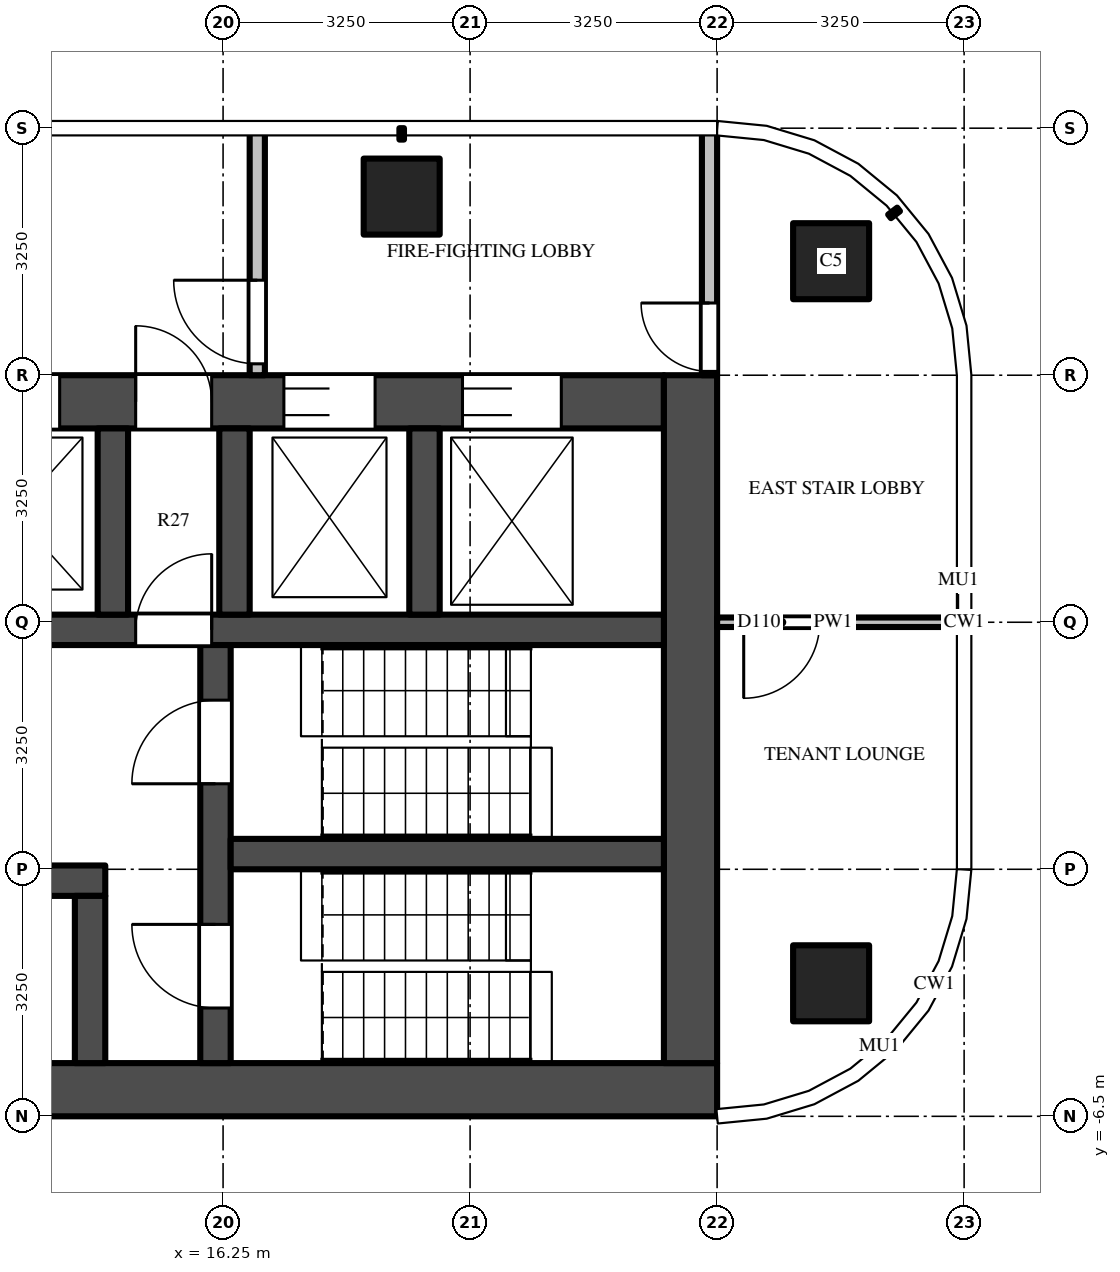
"""IFC4 building model, lengths in metres.
Left out: names, types, materials, properties, quantities, classifications, styles, units other than length and angle.
Written with IfcOpenShell. Run it as: python <this file> out.ifc"""

import sys

from ifc_helpers import new_model, si_unit, direction, frame, frame_2d, origin, origin_2d, place, context, subcontext, project, spatial, rectangle, extrude, source, transform, mapped, element, fill, save


model = new_model("IFC4")
c1 = context("Model", 3, precision=1e-05, world=origin(), true_north=direction((0.0, 1.0)))
c2 = subcontext(c1, "Body", "Model", "MODEL_VIEW")
j1 = project(units=[si_unit("LENGTHUNIT", "METRE"), si_unit("PLANEANGLEUNIT", "RADIAN")], contexts=[c1])
p1 = place(None, origin())
s1 = spatial("IfcSite", under=j1, at=p1, CompositionType="ELEMENT")
p2 = place(p1, origin())
s2 = spatial("IfcBuilding", under=s1, at=p2, CompositionType="ELEMENT")
p3 = place(p2, frame((0.0, 0.0, 302.8)))
s3 = spatial("IfcBuildingStorey", under=s2, at=p3, CompositionType="ELEMENT", Elevation=302.8)
m1 = source(origin(), c2, "Body", "SweptSolid", [
    extrude(rectangle(XDim=1.0, YDim=1.0, at=origin_2d()), origin(), (0.0, 0.0, 1.0), 3.9),
])
for number, where, z_axis, x_axis in (
    (1, (18.6, 5.6, 0.0), (0.0, 0.0, 1.0), (1.0, 0.0, 0.0)),
    (2, (24.25, 4.75, 0.0), (0.0, 0.0, 1.0), (1.0, 0.0, 0.0)),
    (3, (24.25, -4.75, 0.0), (0.0, 0.0, 1.0), (1.0, 0.0, 0.0)),
):
    element("IfcColumn", number, at=place(p3, frame(where, z_axis=z_axis, x_axis=x_axis)), inside=s3, PredefinedType="COLUMN", context=c2, shape_type="MappedRepresentation", body=[
        mapped(m1, transform((0.0, 0.0, 0.0))),
    ])
m2 = source(origin(), c2, "Body", "SweptSolid", [
    extrude(rectangle(XDim=16.65, YDim=0.7, at=frame_2d((8.325, 0.0))), origin(), (0.0, 0.0, 1.0), 3.7),
])
p4 = place(p3, frame((6.1, -6.15, 0.0), z_axis=(0.0, 0.0, 1.0), x_axis=(1.0, 0.0, 0.0)))
e4 = element("IfcWall", 4, at=p4, inside=s3, PredefinedType="SHEAR", context=c2, shape_type="MappedRepresentation", body=[
    mapped(m2, transform((0.0, 0.0, 0.0))),
])
m3 = source(origin(), c2, "Body", "SweptSolid", [
    extrude(rectangle(XDim=14.85, YDim=0.7, at=frame_2d((7.425, 0.0))), origin(), (0.0, 0.0, 1.0), 3.7),
])
p5 = place(p3, frame((7.2, 2.9, 0.0), z_axis=(0.0, 0.0, 1.0), x_axis=(1.0, 0.0, 0.0)))
e5 = element("IfcWall", 5, at=p5, inside=s3, PredefinedType="SHEAR", context=c2, shape_type="MappedRepresentation", body=[
    mapped(m3, transform((0.0, 0.0, 0.0))),
])
m4 = source(origin(), c2, "Body", "SweptSolid", [
    extrude(rectangle(XDim=1.2, YDim=2.1, at=frame_2d((0.6, 1.05))), frame((0.0, 0.36, 0.0), z_axis=(0.0, -1.0, 0.0), x_axis=(1.0, 0.0, 0.0)), (0.0, 0.0, 1.0), 0.72),
])
p6 = place(p5, frame((5.7, 0.0, 0.0)))
e6 = element("IfcOpeningElement", 6, at=p6, cuts=e5, PredefinedType="OPENING", context=c2, shape_type="MappedRepresentation", body=[
    mapped(m4, transform((0.0, 0.0, 0.0))),
])
m5 = source(origin(), c2, "Body", "SweptSolid", [
    extrude(rectangle(XDim=1.3, YDim=2.1, at=frame_2d((0.65, 1.05))), frame((0.0, 0.36, 0.0), z_axis=(0.0, -1.0, 0.0), x_axis=(1.0, 0.0, 0.0)), (0.0, 0.0, 1.0), 0.72),
])
p7 = place(p5, frame((12.2, 0.0, 0.0)))
e7 = element("IfcOpeningElement", 7, at=p7, cuts=e5, PredefinedType="OPENING", context=c2, shape_type="MappedRepresentation", body=[
    mapped(m5, transform((0.0, 0.0, 0.0))),
])
p8 = place(p5, frame((9.85, 0.0, 0.0)))
e8 = element("IfcOpeningElement", 8, at=p8, cuts=e5, PredefinedType="OPENING", context=c2, shape_type="MappedRepresentation", body=[
    mapped(m4, transform((0.0, 0.0, 0.0))),
])
m6 = source(origin(), c2, "Body", "SweptSolid", [
    extrude(rectangle(XDim=1.0, YDim=2.1, at=frame_2d((0.5, 1.05))), frame((0.0, 0.36, 0.0), z_axis=(0.0, -1.0, 0.0), x_axis=(1.0, 0.0, 0.0)), (0.0, 0.0, 1.0), 0.72),
])
p9 = place(p5, frame((7.9, 0.0, 0.0)))
e9 = element("IfcOpeningElement", 9, at=p9, cuts=e5, PredefinedType="OPENING", context=c2, shape_type="MappedRepresentation", body=[
    mapped(m6, transform((0.0, 0.0, 0.0))),
])
m7 = source(origin(), c2, "Body", "SweptSolid", [
    extrude(rectangle(XDim=0.8, YDim=2.1, at=frame_2d((0.4, 1.05))), frame((0.0, 0.36, 0.0), z_axis=(0.0, -1.0, 0.0), x_axis=(1.0, 0.0, 0.0)), (0.0, 0.0, 1.0), 0.72),
])
p10 = place(p5, frame((0.212, 0.0, 0.0)))
e10 = element("IfcOpeningElement", 10, at=p10, cuts=e5, PredefinedType="OPENING", context=c2, shape_type="MappedRepresentation", body=[
    mapped(m7, transform((0.0, 0.0, 0.0))),
])
p11 = place(p5, frame((1.95, 0.0, 0.0)))
e11 = element("IfcOpeningElement", 11, at=p11, cuts=e5, PredefinedType="OPENING", context=c2, shape_type="MappedRepresentation", body=[
    mapped(m6, transform((0.0, 0.0, 0.0))),
])
p12 = place(p5, frame((3.837, 0.0, 0.0)))
e12 = element("IfcOpeningElement", 12, at=p12, cuts=e5, PredefinedType="OPENING", context=c2, shape_type="MappedRepresentation", body=[
    mapped(m7, transform((0.0, 0.0, 0.0))),
])
m8 = source(origin(), c2, "Body", "SweptSolid", [
    extrude(rectangle(XDim=9.05, YDim=0.7, at=frame_2d((4.525, 0.0))), origin(), (0.0, 0.0, 1.0), 3.7),
])
p13 = place(p3, frame((22.4, -5.8, 0.0), z_axis=(0.0, 0.0, 1.0), x_axis=(0.0, 1.0, 0.0)))
e13 = element("IfcWall", 13, at=p13, inside=s3, PredefinedType="SHEAR", context=c2, shape_type="MappedRepresentation", body=[
    mapped(m8, transform((0.0, 0.0, 0.0))),
])
m9 = source(origin(), c2, "Body", "SweptSolid", [
    extrude(rectangle(XDim=7.5, YDim=0.4, at=frame_2d((3.75, 0.0))), origin(), (0.0, 0.0, 1.0), 3.7),
])
p14 = place(p3, frame((7.2, -3.4, 0.0), z_axis=(0.0, 0.0, 1.0), x_axis=(1.0, 0.0, 0.0)))
e14 = element("IfcWall", 14, at=p14, inside=s3, PredefinedType="SHEAR", context=c2, shape_type="MappedRepresentation", body=[
    mapped(m9, transform((0.0, 0.0, 0.0))),
])
m10 = source(origin(), c2, "Body", "SweptSolid", [
    extrude(rectangle(XDim=0.8, YDim=2.1, at=frame_2d((0.4, 1.05))), frame((0.0, 0.21, 0.0), z_axis=(0.0, -1.0, 0.0), x_axis=(1.0, 0.0, 0.0)), (0.0, 0.0, 1.0), 0.42),
])
p15 = place(p14, frame((0.212, 0.0, 0.0)))
e15 = element("IfcOpeningElement", 15, at=p15, cuts=e14, PredefinedType="OPENING", context=c2, shape_type="MappedRepresentation", body=[
    mapped(m10, transform((0.0, 0.0, 0.0))),
])
m11 = source(origin(), c2, "Body", "SweptSolid", [
    extrude(rectangle(XDim=0.9, YDim=2.1, at=frame_2d((0.45, 1.05))), frame((0.0, 0.21, 0.0), z_axis=(0.0, -1.0, 0.0), x_axis=(1.0, 0.0, 0.0)), (0.0, 0.0, 1.0), 0.42),
])
p16 = place(p14, frame((1.75, 0.0, 0.0)))
e16 = element("IfcOpeningElement", 16, at=p16, cuts=e14, PredefinedType="OPENING", context=c2, shape_type="MappedRepresentation", body=[
    mapped(m11, transform((0.0, 0.0, 0.0))),
])
m12 = source(origin(), c2, "Body", "SweptSolid", [
    extrude(rectangle(XDim=1.0, YDim=2.1, at=frame_2d((0.5, 1.05))), frame((0.0, 0.21, 0.0), z_axis=(0.0, -1.0, 0.0), x_axis=(1.0, 0.0, 0.0)), (0.0, 0.0, 1.0), 0.42),
])
p17 = place(p14, frame((4.637, 0.0, 0.0)))
e17 = element("IfcOpeningElement", 17, at=p17, cuts=e14, PredefinedType="OPENING", context=c2, shape_type="MappedRepresentation", body=[
    mapped(m12, transform((0.0, 0.0, 0.0))),
])
m13 = source(origin(), c2, "Body", "SweptSolid", [
    extrude(rectangle(XDim=14.85, YDim=0.4, at=frame_2d((7.425, 0.0))), origin(), (0.0, 0.0, 1.0), 3.7),
])
p18 = place(p3, frame((7.2, -0.1, 0.0), z_axis=(0.0, 0.0, 1.0), x_axis=(1.0, 0.0, 0.0)))
e18 = element("IfcWall", 18, at=p18, inside=s3, PredefinedType="SHEAR", context=c2, shape_type="MappedRepresentation", body=[
    mapped(m13, transform((0.0, 0.0, 0.0))),
])
p19 = place(p18, frame((7.9, 0.0, 0.0)))
e19 = element("IfcOpeningElement", 19, at=p19, cuts=e18, PredefinedType="OPENING", context=c2, shape_type="MappedRepresentation", body=[
    mapped(m12, transform((0.0, 0.0, 0.0))),
])
m14 = source(origin(), c2, "Body", "SweptSolid", [
    extrude(rectangle(XDim=5.5, YDim=0.4, at=frame_2d((2.75, 0.0))), origin(), (0.0, 0.0, 1.0), 3.7),
])
p20 = place(p3, frame((16.15, -5.8, 0.0), z_axis=(0.0, 0.0, 1.0), x_axis=(0.0, 1.0, 0.0)))
e20 = element("IfcWall", 20, at=p20, inside=s3, PredefinedType="SHEAR", context=c2, shape_type="MappedRepresentation", body=[
    mapped(m14, transform((0.0, 0.0, 0.0))),
])
m15 = source(origin(), c2, "Body", "SweptSolid", [
    extrude(rectangle(XDim=1.1, YDim=2.1, at=frame_2d((0.55, 1.05))), frame((0.0, 0.21, 0.0), z_axis=(0.0, -1.0, 0.0), x_axis=(1.0, 0.0, 0.0)), (0.0, 0.0, 1.0), 0.42),
])
p21 = place(p20, frame((0.725, 0.0, 0.0)))
e21 = element("IfcOpeningElement", 21, at=p21, cuts=e20, PredefinedType="OPENING", context=c2, shape_type="MappedRepresentation", body=[
    mapped(m15, transform((0.0, 0.0, 0.0))),
])
p22 = place(p20, frame((3.675, 0.0, 0.0)))
e22 = element("IfcOpeningElement", 22, at=p22, cuts=e20, PredefinedType="OPENING", context=c2, shape_type="MappedRepresentation", body=[
    mapped(m15, transform((0.0, 0.0, 0.0))),
])
m16 = source(origin(), c2, "Body", "SweptSolid", [
    extrude(rectangle(XDim=5.7, YDim=0.4, at=frame_2d((2.85, 0.0))), origin(), (0.0, 0.0, 1.0), 3.7),
])
p23 = place(p3, frame((16.35, -3.05, 0.0), z_axis=(0.0, 0.0, 1.0), x_axis=(1.0, 0.0, 0.0)))
e23 = element("IfcWall", 23, at=p23, inside=s3, PredefinedType="SHEAR", context=c2, shape_type="MappedRepresentation", body=[
    mapped(m16, transform((0.0, 0.0, 0.0))),
])
m17 = source(origin(), c2, "Body", "SweptSolid", [
    extrude(rectangle(XDim=2.2, YDim=0.4, at=frame_2d((1.1, 0.0))), origin(), (0.0, 0.0, 1.0), 3.7),
])
p24 = place(p3, frame((14.5, -5.8, 0.0), z_axis=(0.0, 0.0, 1.0), x_axis=(0.0, 1.0, 0.0)))
e24 = element("IfcWall", 24, at=p24, inside=s3, PredefinedType="SHEAR", context=c2, shape_type="MappedRepresentation", body=[
    mapped(m17, transform((0.0, 0.0, 0.0))),
])
m18 = source(origin(), c2, "Body", "SweptSolid", [
    extrude(rectangle(XDim=2.45, YDim=0.4, at=frame_2d((1.225, 0.0))), origin(), (0.0, 0.0, 1.0), 3.7),
])
for number, where, z_axis, x_axis in (
    (25, (14.8, 0.1, 0.0), (0.0, 0.0, 1.0), (0.0, 1.0, 0.0)),
    (26, (16.4, 0.1, 0.0), (0.0, 0.0, 1.0), (0.0, 1.0, 0.0)),
    (27, (18.9, 0.1, 0.0), (0.0, 0.0, 1.0), (0.0, 1.0, 0.0)),
):
    element("IfcWall", number, at=place(p3, frame(where, z_axis=z_axis, x_axis=x_axis)), inside=s3, PredefinedType="SHEAR", context=c2, shape_type="MappedRepresentation", body=[
        mapped(m18, transform((0.0, 0.0, 0.0))),
    ])
m19 = source(origin(), c2, "Body", "SweptSolid", [
    extrude(rectangle(XDim=3.25, YDim=0.2, at=frame_2d((1.625, 0.0))), origin(), (0.0, 0.0, 1.0), 3.7),
])
p25 = place(p3, frame((16.7, 3.25, 0.0), z_axis=(0.0, 0.0, 1.0), x_axis=(0.0, 1.0, 0.0)))
e28 = element("IfcWall", 28, at=p25, inside=s3, PredefinedType="PARTITIONING", context=c2, shape_type="MappedRepresentation", body=[
    mapped(m19, transform((0.0, 0.0, 0.0))),
])
m20 = source(origin(), c2, "Body", "SweptSolid", [
    extrude(rectangle(XDim=1.1, YDim=2.1, at=frame_2d((0.55, 1.05))), frame((0.0, 0.11, 0.0), z_axis=(0.0, -1.0, 0.0), x_axis=(1.0, 0.0, 0.0)), (0.0, 0.0, 1.0), 0.22),
])
p26 = place(p25, frame((0.15, 0.0, 0.0)))
e29 = element("IfcOpeningElement", 29, at=p26, cuts=e28, PredefinedType="OPENING", context=c2, shape_type="MappedRepresentation", body=[
    mapped(m20, transform((0.0, 0.0, 0.0))),
])
p27 = place(p3, frame((22.65, 3.25, 0.0), z_axis=(0.0, 0.0, 1.0), x_axis=(0.0, 1.0, 0.0)))
e30 = element("IfcWall", 30, at=p27, inside=s3, PredefinedType="PARTITIONING", context=c2, shape_type="MappedRepresentation", body=[
    mapped(m19, transform((0.0, 0.0, 0.0))),
])
m21 = source(origin(), c2, "Body", "SweptSolid", [
    extrude(rectangle(XDim=0.9, YDim=2.1, at=frame_2d((0.45, 1.05))), frame((0.0, 0.11, 0.0), z_axis=(0.0, -1.0, 0.0), x_axis=(1.0, 0.0, 0.0)), (0.0, 0.0, 1.0), 0.22),
])
p28 = place(p27, frame((0.05, 0.0, 0.0)))
e31 = element("IfcOpeningElement", 31, at=p28, cuts=e30, PredefinedType="OPENING", context=c2, shape_type="MappedRepresentation", body=[
    mapped(m21, transform((0.0, 0.0, 0.0))),
])
m22 = source(origin(), c2, "Body", "SweptSolid", [
    extrude(rectangle(XDim=3.05, YDim=0.125, at=frame_2d((1.525, 0.0))), origin(), (0.0, 0.0, 1.0), 2.78),
])
p29 = place(p3, frame((25.8, 0.0, 0.0), z_axis=(0.0, 0.0, 1.0), x_axis=(-1.0, 0.0, 0.0)))
e32 = element("IfcWall", 32, at=p29, inside=s3, PredefinedType="PARTITIONING", context=c2, shape_type="MappedRepresentation", body=[
    mapped(m22, transform((0.0, 0.0, 0.0))),
])
m23 = source(origin(), c2, "Body", "SweptSolid", [
    extrude(rectangle(XDim=1.0, YDim=2.1, at=frame_2d((0.5, 1.05))), frame((0.0, 0.073, 0.0), z_axis=(0.0, -1.0, 0.0), x_axis=(1.0, 0.0, 0.0)), (0.0, 0.0, 1.0), 0.145),
])
p30 = place(p29, frame((1.7, 0.0, 0.0)))
e33 = element("IfcOpeningElement", 33, at=p30, cuts=e32, PredefinedType="OPENING", context=c2, shape_type="MappedRepresentation", body=[
    mapped(m23, transform((0.0, 0.0, 0.0))),
])
m24 = source(origin(), c2, "Body", "SweptSolid", [
    extrude(rectangle(XDim=1.2, YDim=2.1, at=frame_2d((0.6, 1.05))), frame((0.0, -0.275, 0.0), z_axis=(0.0, -1.0, 0.0), x_axis=(1.0, 0.0, 0.0)), (0.0, 0.0, 1.0), 0.05),
])
p31 = place(p6, origin())
e34 = element("IfcDoor", 34, at=p31, inside=s3, OperationType="DOUBLE_DOOR_SLIDING", PredefinedType="DOOR", context=c2, shape_type="MappedRepresentation", body=[
    mapped(m24, transform((0.0, 0.0, 0.0))),
])
fill(e6, e34)
m25 = source(origin(), c2, "Body", "SweptSolid", [
    extrude(rectangle(XDim=1.3, YDim=2.1, at=frame_2d((0.65, 1.05))), frame((0.0, -0.275, 0.0), z_axis=(0.0, -1.0, 0.0), x_axis=(1.0, 0.0, 0.0)), (0.0, 0.0, 1.0), 0.05),
])
p32 = place(p7, origin())
e35 = element("IfcDoor", 35, at=p32, inside=s3, OperationType="DOUBLE_DOOR_SLIDING", PredefinedType="DOOR", context=c2, shape_type="MappedRepresentation", body=[
    mapped(m25, transform((0.0, 0.0, 0.0))),
])
fill(e7, e35)
p33 = place(p8, origin())
e36 = element("IfcDoor", 36, at=p33, inside=s3, OperationType="DOUBLE_DOOR_SLIDING", PredefinedType="DOOR", context=c2, shape_type="MappedRepresentation", body=[
    mapped(m24, transform((0.0, 0.0, 0.0))),
])
fill(e8, e36)
m26 = source(origin(), c2, "Body", "SweptSolid", [
    extrude(rectangle(XDim=1.1, YDim=2.1, at=frame_2d((0.55, 1.05))), frame((0.0, 0.025, 0.0), z_axis=(0.0, -1.0, 0.0), x_axis=(1.0, 0.0, 0.0)), (0.0, 0.0, 1.0), 0.05),
])
p34 = place(p21, origin())
e37 = element("IfcDoor", 37, at=p34, inside=s3, OperationType="SINGLE_SWING_RIGHT", PredefinedType="DOOR", context=c2, shape_type="MappedRepresentation", body=[
    mapped(m26, transform((0.0, 0.0, 0.0))),
])
fill(e21, e37)
p35 = place(p22, origin())
e38 = element("IfcDoor", 38, at=p35, inside=s3, OperationType="SINGLE_SWING_LEFT", PredefinedType="DOOR", context=c2, shape_type="MappedRepresentation", body=[
    mapped(m26, transform((0.0, 0.0, 0.0))),
])
fill(e22, e38)
m27 = source(origin(), c2, "Body", "SweptSolid", [
    extrude(rectangle(XDim=1.0, YDim=2.1, at=frame_2d((0.5, 1.05))), frame((0.0, 0.025, 0.0), z_axis=(0.0, -1.0, 0.0), x_axis=(1.0, 0.0, 0.0)), (0.0, 0.0, 1.0), 0.05),
])
p36 = place(p19, origin())
e39 = element("IfcDoor", 39, at=p36, inside=s3, OperationType="SINGLE_SWING_RIGHT", PredefinedType="DOOR", context=c2, shape_type="MappedRepresentation", body=[
    mapped(m27, transform((0.0, 0.0, 0.0))),
])
fill(e19, e39)
m28 = source(origin(), c2, "Body", "SweptSolid", [
    extrude(rectangle(XDim=1.0, YDim=2.1, at=frame_2d((0.5, 1.05))), frame((0.0, -0.275, 0.0), z_axis=(0.0, -1.0, 0.0), x_axis=(1.0, 0.0, 0.0)), (0.0, 0.0, 1.0), 0.05),
])
p37 = place(p9, origin())
e40 = element("IfcDoor", 40, at=p37, inside=s3, OperationType="SINGLE_SWING_LEFT", PredefinedType="DOOR", context=c2, shape_type="MappedRepresentation", body=[
    mapped(m28, transform((0.0, 0.0, 0.0))),
])
fill(e9, e40)
p38 = place(p26, origin())
e41 = element("IfcDoor", 41, at=p38, inside=s3, OperationType="SINGLE_SWING_RIGHT", PredefinedType="DOOR", context=c2, shape_type="MappedRepresentation", body=[
    mapped(m26, transform((0.0, 0.0, 0.0))),
])
fill(e29, e41)
m29 = source(origin(), c2, "Body", "SweptSolid", [
    extrude(rectangle(XDim=0.9, YDim=2.1, at=frame_2d((0.45, 1.05))), frame((0.0, 0.025, 0.0), z_axis=(0.0, -1.0, 0.0), x_axis=(1.0, 0.0, 0.0)), (0.0, 0.0, 1.0), 0.05),
])
p39 = place(p28, origin())
e42 = element("IfcDoor", 42, at=p39, inside=s3, OperationType="SINGLE_SWING_RIGHT", PredefinedType="DOOR", context=c2, shape_type="MappedRepresentation", body=[
    mapped(m29, transform((0.0, 0.0, 0.0))),
])
fill(e31, e42)
p40 = place(p30, origin())
e43 = element("IfcDoor", 43, at=p40, inside=s3, OperationType="SINGLE_SWING_RIGHT", PredefinedType="DOOR", context=c2, shape_type="MappedRepresentation", body=[
    mapped(m27, transform((0.0, 0.0, 0.0))),
])
fill(e33, e43)
save(model, sys.argv[1])
